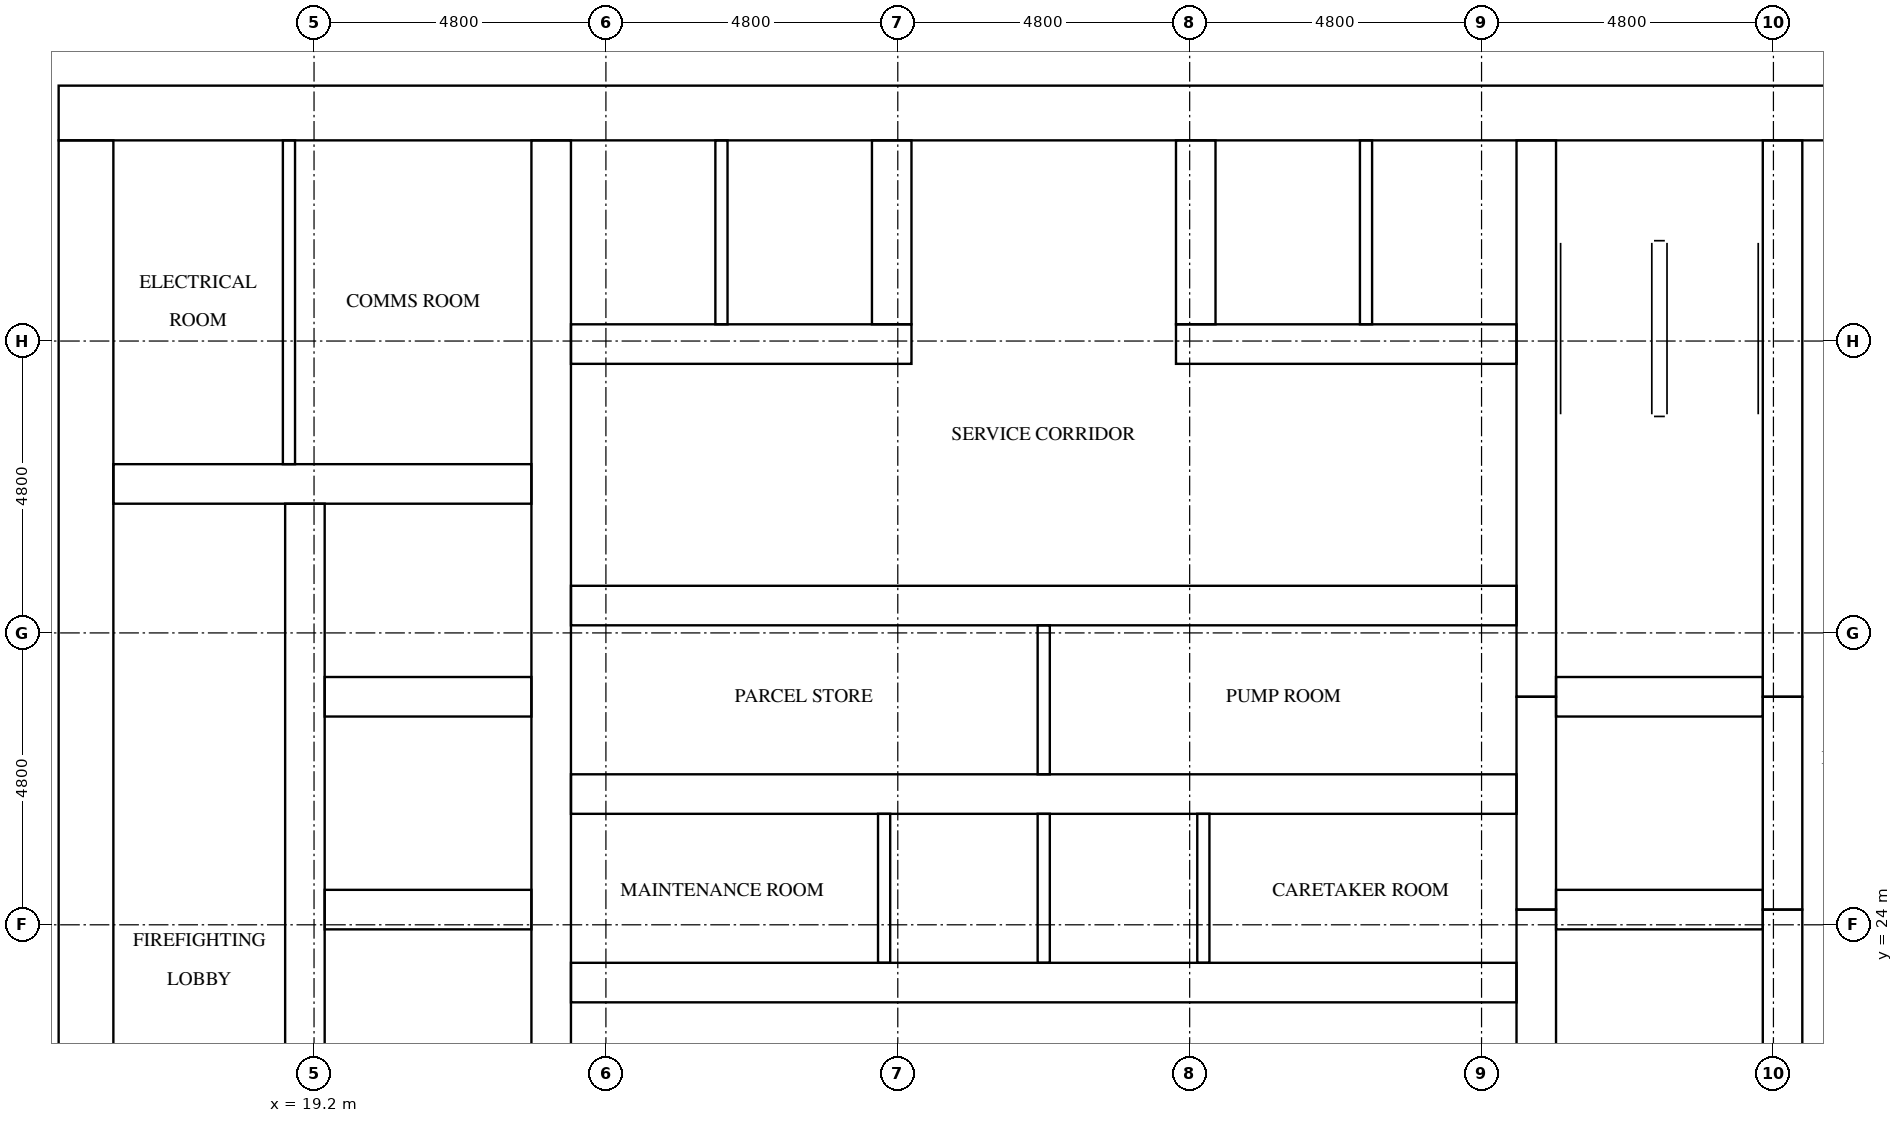
"""IFC4 building model, lengths in metres.
Left out: names, types, materials, properties, quantities, classifications, styles, units other than length and angle.
Written with IfcOpenShell. Run it as: python <this file> out.ifc"""

import sys

from ifc_helpers import new_model, si_unit, direction, frame, frame_2d, origin, place, context, subcontext, project, spatial, rectangle, extrude, element, fill, save


model = new_model("IFC4")
c1 = context("Model", 3, precision=1e-05, world=origin(), true_north=direction((0.0, 1.0)))
c2 = subcontext(c1, "Body", "Model", "MODEL_VIEW")
j1 = project(units=[si_unit("LENGTHUNIT", "METRE"), si_unit("PLANEANGLEUNIT", "RADIAN")], contexts=[c1])
p1 = place(None, origin())
s1 = spatial("IfcSite", under=j1, at=p1, CompositionType="ELEMENT")
p2 = place(p1, origin())
s2 = spatial("IfcBuilding", under=s1, at=p2, CompositionType="ELEMENT")
p3 = place(p2, frame((0.0, 0.0, 96.2)))
s3 = spatial("IfcBuildingStorey", under=s2, at=p3, CompositionType="ELEMENT", Elevation=96.2)
p4 = place(p3, frame((15.0, 37.35, 0.0), z_axis=(0.0, 0.0, 1.0), x_axis=(1.0, 0.0, 0.0)))
e1 = element("IfcWall", 1, at=p4, inside=s3, PredefinedType="SHEAR", context=c2, shape_type="SweptSolid", body=[
    extrude(rectangle(XDim=32.4, YDim=0.9, at=frame_2d((16.2, 0.0))), origin(), (0.0, 0.0, 1.0), 3.2),
])
p5 = place(p4, frame((15.3, 0.0, 0.0)))
e2 = element("IfcOpeningElement", 2, at=p5, cuts=e1, PredefinedType="OPENING", context=c2, shape_type="SweptSolid", body=[
    extrude(rectangle(XDim=1.8, YDim=2.1, at=frame_2d((0.9, 1.05))), frame((0.0, 0.46, 0.0), z_axis=(0.0, -1.0, 0.0), x_axis=(1.0, 0.0, 0.0)), (0.0, 0.0, 1.0), 0.92),
])
p6 = place(p4, frame((1.794, 0.0, 0.0)))
e3 = element("IfcOpeningElement", 3, at=p6, cuts=e1, PredefinedType="OPENING", context=c2, shape_type="SweptSolid", body=[
    extrude(rectangle(XDim=1.0, YDim=2.1, at=frame_2d((0.5, 1.05))), frame((0.0, 0.46, 0.0), z_axis=(0.0, -1.0, 0.0), x_axis=(1.0, 0.0, 0.0)), (0.0, 0.0, 1.0), 0.92),
])
p7 = place(p4, frame((5.331, 0.0, 0.0)))
e4 = element("IfcOpeningElement", 4, at=p7, cuts=e1, PredefinedType="OPENING", context=c2, shape_type="SweptSolid", body=[
    extrude(rectangle(XDim=1.0, YDim=2.1, at=frame_2d((0.5, 1.05))), frame((0.0, 0.46, 0.0), z_axis=(0.0, -1.0, 0.0), x_axis=(1.0, 0.0, 0.0)), (0.0, 0.0, 1.0), 0.92),
])
p8 = place(p3, frame((15.45, 15.9, 0.0), z_axis=(0.0, 0.0, 1.0), x_axis=(0.0, 1.0, 0.0)))
e5 = element("IfcWall", 5, at=p8, inside=s3, PredefinedType="SHEAR", context=c2, shape_type="SweptSolid", body=[
    extrude(rectangle(XDim=21.0, YDim=0.9, at=frame_2d((10.5, 0.0))), origin(), (0.0, 0.0, 1.0), 3.2),
])
p9 = place(p8, frame((4.86, 0.0, 0.0)))
e6 = element("IfcOpeningElement", 6, at=p9, cuts=e5, PredefinedType="OPENING", context=c2, shape_type="SweptSolid", body=[
    extrude(rectangle(XDim=1.2, YDim=2.1, at=frame_2d((0.6, 1.05))), frame((0.0, 0.46, 0.0), z_axis=(0.0, -1.0, 0.0), x_axis=(1.0, 0.0, 0.0)), (0.0, 0.0, 1.0), 0.92),
])
p10 = place(p3, frame((19.05, 15.9, 0.0), z_axis=(0.0, 0.0, 1.0), x_axis=(0.0, 1.0, 0.0)))
e7 = element("IfcWall", 7, at=p10, inside=s3, PredefinedType="SHEAR", context=c2, shape_type="SweptSolid", body=[
    extrude(rectangle(XDim=15.025, YDim=0.65, at=frame_2d((7.513, 0.0))), origin(), (0.0, 0.0, 1.0), 3.2),
])
p11 = place(p10, frame((9.55, 0.0, 0.0)))
e8 = element("IfcOpeningElement", 8, at=p11, cuts=e7, PredefinedType="OPENING", context=c2, shape_type="SweptSolid", body=[
    extrude(rectangle(XDim=1.1, YDim=2.1, at=frame_2d((0.55, 1.05))), frame((0.0, 0.335, 0.0), z_axis=(0.0, -1.0, 0.0), x_axis=(1.0, 0.0, 0.0)), (0.0, 0.0, 1.0), 0.67),
])
p12 = place(p10, frame((13.05, 0.0, 0.0)))
e9 = element("IfcOpeningElement", 9, at=p12, cuts=e7, PredefinedType="OPENING", context=c2, shape_type="SweptSolid", body=[
    extrude(rectangle(XDim=1.1, YDim=2.1, at=frame_2d((0.55, 1.05))), frame((0.0, 0.335, 0.0), z_axis=(0.0, -1.0, 0.0), x_axis=(1.0, 0.0, 0.0)), (0.0, 0.0, 1.0), 0.67),
])
p13 = place(p10, frame((0.3, 0.0, 0.0)))
e10 = element("IfcOpeningElement", 10, at=p13, cuts=e7, PredefinedType="OPENING", context=c2, shape_type="SweptSolid", body=[
    extrude(rectangle(XDim=1.2, YDim=2.1, at=frame_2d((0.6, 1.05))), frame((0.0, 0.335, 0.0), z_axis=(0.0, -1.0, 0.0), x_axis=(1.0, 0.0, 0.0)), (0.0, 0.0, 1.0), 0.67),
])
p14 = place(p3, frame((23.1, 15.9, 0.0), z_axis=(0.0, 0.0, 1.0), x_axis=(0.0, 1.0, 0.0)))
e11 = element("IfcWall", 11, at=p14, inside=s3, PredefinedType="SHEAR", context=c2, shape_type="SweptSolid", body=[
    extrude(rectangle(XDim=21.0, YDim=0.65, at=frame_2d((10.5, 0.0))), origin(), (0.0, 0.0, 1.0), 3.2),
])
p15 = place(p3, frame((39.3, 15.9, 0.0), z_axis=(0.0, 0.0, 1.0), x_axis=(0.0, 1.0, 0.0)))
e12 = element("IfcWall", 12, at=p15, inside=s3, PredefinedType="SHEAR", context=c2, shape_type="SweptSolid", body=[
    extrude(rectangle(XDim=8.35, YDim=0.65, at=frame_2d((4.175, 0.0))), origin(), (0.0, 0.0, 1.0), 3.2),
])
p16 = place(p3, frame((39.3, 24.25, 0.0), z_axis=(0.0, 0.0, 1.0), x_axis=(0.0, 1.0, 0.0)))
e13 = element("IfcWall", 13, at=p16, inside=s3, PredefinedType="SHEAR", context=c2, shape_type="SweptSolid", body=[
    extrude(rectangle(XDim=3.5, YDim=0.65, at=frame_2d((1.75, 0.0))), origin(), (0.0, 0.0, 1.0), 3.2),
])
p17 = place(p3, frame((39.3, 27.75, 0.0), z_axis=(0.0, 0.0, 1.0), x_axis=(0.0, 1.0, 0.0)))
e14 = element("IfcWall", 14, at=p17, inside=s3, PredefinedType="SHEAR", context=c2, shape_type="SweptSolid", body=[
    extrude(rectangle(XDim=9.15, YDim=0.65, at=frame_2d((4.575, 0.0))), origin(), (0.0, 0.0, 1.0), 3.2),
])
p18 = place(p3, frame((43.35, 15.9, 0.0), z_axis=(0.0, 0.0, 1.0), x_axis=(0.0, 1.0, 0.0)))
e15 = element("IfcWall", 15, at=p18, inside=s3, PredefinedType="SHEAR", context=c2, shape_type="SweptSolid", body=[
    extrude(rectangle(XDim=8.35, YDim=0.65, at=frame_2d((4.175, 0.0))), origin(), (0.0, 0.0, 1.0), 3.2),
])
p19 = place(p18, frame((0.3, 0.0, 0.0)))
e16 = element("IfcOpeningElement", 16, at=p19, cuts=e15, PredefinedType="OPENING", context=c2, shape_type="SweptSolid", body=[
    extrude(rectangle(XDim=1.2, YDim=2.1, at=frame_2d((0.6, 1.05))), frame((0.0, 0.335, 0.0), z_axis=(0.0, -1.0, 0.0), x_axis=(1.0, 0.0, 0.0)), (0.0, 0.0, 1.0), 0.67),
])
p20 = place(p3, frame((43.35, 24.25, 0.0), z_axis=(0.0, 0.0, 1.0), x_axis=(0.0, 1.0, 0.0)))
e17 = element("IfcWall", 17, at=p20, inside=s3, PredefinedType="SHEAR", context=c2, shape_type="SweptSolid", body=[
    extrude(rectangle(XDim=3.5, YDim=0.65, at=frame_2d((1.75, 0.0))), origin(), (0.0, 0.0, 1.0), 3.2),
])
p21 = place(p20, frame((1.2, 0.0, 0.0)))
e18 = element("IfcOpeningElement", 18, at=p21, cuts=e17, PredefinedType="OPENING", context=c2, shape_type="SweptSolid", body=[
    extrude(rectangle(XDim=1.1, YDim=2.1, at=frame_2d((0.55, 1.05))), frame((0.0, 0.335, 0.0), z_axis=(0.0, -1.0, 0.0), x_axis=(1.0, 0.0, 0.0)), (0.0, 0.0, 1.0), 0.67),
])
p22 = place(p3, frame((43.35, 27.75, 0.0), z_axis=(0.0, 0.0, 1.0), x_axis=(0.0, 1.0, 0.0)))
e19 = element("IfcWall", 19, at=p22, inside=s3, PredefinedType="SHEAR", context=c2, shape_type="SweptSolid", body=[
    extrude(rectangle(XDim=9.15, YDim=0.65, at=frame_2d((4.575, 0.0))), origin(), (0.0, 0.0, 1.0), 3.2),
])
p23 = place(p22, frame((7.65, 0.0, 0.0)))
e20 = element("IfcOpeningElement", 20, at=p23, cuts=e19, PredefinedType="OPENING", context=c2, shape_type="SweptSolid", body=[
    extrude(rectangle(XDim=1.2, YDim=2.1, at=frame_2d((0.6, 1.05))), frame((0.0, 0.335, 0.0), z_axis=(0.0, -1.0, 0.0), x_axis=(1.0, 0.0, 0.0)), (0.0, 0.0, 1.0), 0.67),
])
for number, where, z_axis, x_axis in (
    (21, (19.375, 24.25, 0.0), (0.0, 0.0, 1.0), (1.0, 0.0, 0.0)),
    (22, (19.375, 27.75, 0.0), (0.0, 0.0, 1.0), (1.0, 0.0, 0.0)),
):
    element("IfcWall", number, at=place(p3, frame(where, z_axis=z_axis, x_axis=x_axis)), inside=s3, PredefinedType="SHEAR", context=c2, shape_type="SweptSolid", body=[
        extrude(rectangle(XDim=3.4, YDim=0.65, at=frame_2d((1.7, 0.0))), origin(), (0.0, 0.0, 1.0), 3.2),
    ])
p24 = place(p3, frame((15.9, 31.25, 0.0), z_axis=(0.0, 0.0, 1.0), x_axis=(1.0, 0.0, 0.0)))
e23 = element("IfcWall", 23, at=p24, inside=s3, PredefinedType="SHEAR", context=c2, shape_type="SweptSolid", body=[
    extrude(rectangle(XDim=6.875, YDim=0.65, at=frame_2d((3.438, 0.0))), origin(), (0.0, 0.0, 1.0), 3.2),
])
for number, where, z_axis, x_axis in (
    (24, (39.625, 24.25, 0.0), (0.0, 0.0, 1.0), (1.0, 0.0, 0.0)),
    (25, (39.625, 27.75, 0.0), (0.0, 0.0, 1.0), (1.0, 0.0, 0.0)),
):
    element("IfcWall", number, at=place(p3, frame(where, z_axis=z_axis, x_axis=x_axis)), inside=s3, PredefinedType="SHEAR", context=c2, shape_type="SweptSolid", body=[
        extrude(rectangle(XDim=3.4, YDim=0.65, at=frame_2d((1.7, 0.0))), origin(), (0.0, 0.0, 1.0), 3.2),
    ])
p25 = place(p3, frame((23.425, 23.05, 0.0), z_axis=(0.0, 0.0, 1.0), x_axis=(1.0, 0.0, 0.0)))
e26 = element("IfcWall", 26, at=p25, inside=s3, PredefinedType="SHEAR", context=c2, shape_type="SweptSolid", body=[
    extrude(rectangle(XDim=15.55, YDim=0.65, at=frame_2d((7.775, 0.0))), origin(), (0.0, 0.0, 1.0), 3.2),
])
p26 = place(p25, frame((2.025, 0.0, 0.0)))
e27 = element("IfcOpeningElement", 27, at=p26, cuts=e26, PredefinedType="OPENING", context=c2, shape_type="SweptSolid", body=[
    extrude(rectangle(XDim=1.0, YDim=2.1, at=frame_2d((0.5, 1.05))), frame((0.0, 0.335, 0.0), z_axis=(0.0, -1.0, 0.0), x_axis=(1.0, 0.0, 0.0)), (0.0, 0.0, 1.0), 0.67),
])
p27 = place(p25, frame((12.525, 0.0, 0.0)))
e28 = element("IfcOpeningElement", 28, at=p27, cuts=e26, PredefinedType="OPENING", context=c2, shape_type="SweptSolid", body=[
    extrude(rectangle(XDim=1.0, YDim=2.1, at=frame_2d((0.5, 1.05))), frame((0.0, 0.335, 0.0), z_axis=(0.0, -1.0, 0.0), x_axis=(1.0, 0.0, 0.0)), (0.0, 0.0, 1.0), 0.67),
])
p28 = place(p3, frame((23.425, 26.15, 0.0), z_axis=(0.0, 0.0, 1.0), x_axis=(1.0, 0.0, 0.0)))
e29 = element("IfcWall", 29, at=p28, inside=s3, PredefinedType="SHEAR", context=c2, shape_type="SweptSolid", body=[
    extrude(rectangle(XDim=15.55, YDim=0.65, at=frame_2d((7.775, 0.0))), origin(), (0.0, 0.0, 1.0), 3.2),
])
p29 = place(p3, frame((23.425, 29.25, 0.0), z_axis=(0.0, 0.0, 1.0), x_axis=(1.0, 0.0, 0.0)))
e30 = element("IfcWall", 30, at=p29, inside=s3, PredefinedType="SHEAR", context=c2, shape_type="SweptSolid", body=[
    extrude(rectangle(XDim=15.55, YDim=0.65, at=frame_2d((7.775, 0.0))), origin(), (0.0, 0.0, 1.0), 3.2),
])
p30 = place(p29, frame((3.337, 0.0, 0.0)))
e31 = element("IfcOpeningElement", 31, at=p30, cuts=e30, PredefinedType="OPENING", context=c2, shape_type="SweptSolid", body=[
    extrude(rectangle(XDim=1.0, YDim=2.1, at=frame_2d((0.5, 1.05))), frame((0.0, 0.335, 0.0), z_axis=(0.0, -1.0, 0.0), x_axis=(1.0, 0.0, 0.0)), (0.0, 0.0, 1.0), 0.67),
])
p31 = place(p29, frame((11.212, 0.0, 0.0)))
e32 = element("IfcOpeningElement", 32, at=p31, cuts=e30, PredefinedType="OPENING", context=c2, shape_type="SweptSolid", body=[
    extrude(rectangle(XDim=1.0, YDim=2.1, at=frame_2d((0.5, 1.05))), frame((0.0, 0.335, 0.0), z_axis=(0.0, -1.0, 0.0), x_axis=(1.0, 0.0, 0.0)), (0.0, 0.0, 1.0), 0.67),
])
p32 = place(p3, frame((23.425, 33.55, 0.0), z_axis=(0.0, 0.0, 1.0), x_axis=(1.0, 0.0, 0.0)))
e33 = element("IfcWall", 33, at=p32, inside=s3, PredefinedType="SHEAR", context=c2, shape_type="SweptSolid", body=[
    extrude(rectangle(XDim=5.6, YDim=0.65, at=frame_2d((2.8, 0.0))), origin(), (0.0, 0.0, 1.0), 3.2),
])
p33 = place(p3, frame((33.375, 33.55, 0.0), z_axis=(0.0, 0.0, 1.0), x_axis=(1.0, 0.0, 0.0)))
e34 = element("IfcWall", 34, at=p33, inside=s3, PredefinedType="SHEAR", context=c2, shape_type="SweptSolid", body=[
    extrude(rectangle(XDim=5.6, YDim=0.65, at=frame_2d((2.8, 0.0))), origin(), (0.0, 0.0, 1.0), 3.2),
])
for number, where, z_axis, x_axis in (
    (35, (28.7, 33.875, 0.0), (0.0, 0.0, 1.0), (0.0, 1.0, 0.0)),
    (36, (33.7, 33.875, 0.0), (0.0, 0.0, 1.0), (0.0, 1.0, 0.0)),
):
    element("IfcWall", number, at=place(p3, frame(where, z_axis=z_axis, x_axis=x_axis)), inside=s3, PredefinedType="SHEAR", context=c2, shape_type="SweptSolid", body=[
        extrude(rectangle(XDim=3.025, YDim=0.65, at=frame_2d((1.512, 0.0))), origin(), (0.0, 0.0, 1.0), 3.2),
    ])
for number, where, z_axis, x_axis in (
    (37, (28.575, 23.375, 0.0), (0.0, 0.0, 1.0), (0.0, 1.0, 0.0)),
    (38, (31.2, 23.375, 0.0), (0.0, 0.0, 1.0), (0.0, 1.0, 0.0)),
    (39, (33.825, 23.375, 0.0), (0.0, 0.0, 1.0), (0.0, 1.0, 0.0)),
):
    element("IfcWall", number, at=place(p3, frame(where, z_axis=z_axis, x_axis=x_axis)), inside=s3, PredefinedType="SOLIDWALL", context=c2, shape_type="SweptSolid", body=[
        extrude(rectangle(XDim=2.45, YDim=0.2, at=frame_2d((1.225, 0.0))), origin(), (0.0, 0.0, 1.0), 3.2),
    ])
for number, where, z_axis, x_axis in (
    (40, (25.9, 33.875, 0.0), (0.0, 0.0, 1.0), (0.0, 1.0, 0.0)),
    (41, (36.5, 33.875, 0.0), (0.0, 0.0, 1.0), (0.0, 1.0, 0.0)),
):
    element("IfcWall", number, at=place(p3, frame(where, z_axis=z_axis, x_axis=x_axis)), inside=s3, PredefinedType="SOLIDWALL", context=c2, shape_type="SweptSolid", body=[
        extrude(rectangle(XDim=3.025, YDim=0.2, at=frame_2d((1.512, 0.0))), origin(), (0.0, 0.0, 1.0), 3.2),
    ])
p34 = place(p3, frame((18.788, 31.575, 0.0), z_axis=(0.0, 0.0, 1.0), x_axis=(0.0, 1.0, 0.0)))
e42 = element("IfcWall", 42, at=p34, inside=s3, PredefinedType="PARTITIONING", context=c2, shape_type="SweptSolid", body=[
    extrude(rectangle(XDim=5.325, YDim=0.2, at=frame_2d((2.663, 0.0))), origin(), (0.0, 0.0, 1.0), 3.2),
])
p35 = place(p3, frame((31.2, 26.475, 0.0), z_axis=(0.0, 0.0, 1.0), x_axis=(0.0, 1.0, 0.0)))
e43 = element("IfcWall", 43, at=p35, inside=s3, PredefinedType="PARTITIONING", context=c2, shape_type="SweptSolid", body=[
    extrude(rectangle(XDim=2.45, YDim=0.2, at=frame_2d((1.225, 0.0))), origin(), (0.0, 0.0, 1.0), 3.2),
])
p36 = place(p11, origin())
e44 = element("IfcDoor", 44, at=p36, inside=s3, OperationType="DOUBLE_DOOR_SLIDING", PredefinedType="DOOR", context=c2, shape_type="SweptSolid", body=[
    extrude(rectangle(XDim=1.1, YDim=2.1, at=frame_2d((0.55, 1.05))), frame((0.0, 0.025, 0.0), z_axis=(0.0, -1.0, 0.0), x_axis=(1.0, 0.0, 0.0)), (0.0, 0.0, 1.0), 0.05),
])
fill(e8, e44)
p37 = place(p12, origin())
e45 = element("IfcDoor", 45, at=p37, inside=s3, OperationType="DOUBLE_DOOR_SLIDING", PredefinedType="DOOR", context=c2, shape_type="SweptSolid", body=[
    extrude(rectangle(XDim=1.1, YDim=2.1, at=frame_2d((0.55, 1.05))), frame((0.0, 0.025, 0.0), z_axis=(0.0, -1.0, 0.0), x_axis=(1.0, 0.0, 0.0)), (0.0, 0.0, 1.0), 0.05),
])
fill(e9, e45)
p38 = place(p21, origin())
e46 = element("IfcDoor", 46, at=p38, inside=s3, OperationType="DOUBLE_DOOR_SLIDING", PredefinedType="DOOR", context=c2, shape_type="SweptSolid", body=[
    extrude(rectangle(XDim=1.1, YDim=2.1, at=frame_2d((0.55, 1.05))), frame((0.0, 0.025, 0.0), z_axis=(0.0, -1.0, 0.0), x_axis=(1.0, 0.0, 0.0)), (0.0, 0.0, 1.0), 0.05),
])
fill(e18, e46)
p39 = place(p23, origin())
e47 = element("IfcDoor", 47, at=p39, inside=s3, OperationType="SINGLE_SWING_RIGHT", PredefinedType="DOOR", context=c2, shape_type="SweptSolid", body=[
    extrude(rectangle(XDim=1.2, YDim=2.1, at=frame_2d((0.6, 1.05))), frame((0.0, 0.025, 0.0), z_axis=(0.0, -1.0, 0.0), x_axis=(1.0, 0.0, 0.0)), (0.0, 0.0, 1.0), 0.05),
])
fill(e20, e47)
p40 = place(p5, origin())
e48 = element("IfcDoor", 48, at=p40, inside=s3, OperationType="DOUBLE_DOOR_SINGLE_SWING", PredefinedType="DOOR", context=c2, shape_type="SweptSolid", body=[
    extrude(rectangle(XDim=1.8, YDim=2.1, at=frame_2d((0.9, 1.05))), frame((0.0, 0.025, 0.0), z_axis=(0.0, -1.0, 0.0), x_axis=(1.0, 0.0, 0.0)), (0.0, 0.0, 1.0), 0.05),
])
fill(e2, e48)
p41 = place(p6, origin())
e49 = element("IfcDoor", 49, at=p41, inside=s3, OperationType="SINGLE_SWING_LEFT", PredefinedType="DOOR", context=c2, shape_type="SweptSolid", body=[
    extrude(rectangle(XDim=1.0, YDim=2.1, at=frame_2d((0.5, 1.05))), frame((0.0, 0.025, 0.0), z_axis=(0.0, -1.0, 0.0), x_axis=(1.0, 0.0, 0.0)), (0.0, 0.0, 1.0), 0.05),
])
fill(e3, e49)
p42 = place(p7, origin())
e50 = element("IfcDoor", 50, at=p42, inside=s3, OperationType="SINGLE_SWING_RIGHT", PredefinedType="DOOR", context=c2, shape_type="SweptSolid", body=[
    extrude(rectangle(XDim=1.0, YDim=2.1, at=frame_2d((0.5, 1.05))), frame((0.0, 0.025, 0.0), z_axis=(0.0, -1.0, 0.0), x_axis=(1.0, 0.0, 0.0)), (0.0, 0.0, 1.0), 0.05),
])
fill(e4, e50)
p43 = place(p26, frame((1.0, 0.0, 0.0), z_axis=(0.0, 0.0, 1.0), x_axis=(-1.0, 0.0, 0.0)))
e51 = element("IfcDoor", 51, at=p43, inside=s3, OperationType="SINGLE_SWING_LEFT", PredefinedType="DOOR", context=c2, shape_type="SweptSolid", body=[
    extrude(rectangle(XDim=1.0, YDim=2.1, at=frame_2d((0.5, 1.05))), frame((0.0, 0.025, 0.0), z_axis=(0.0, -1.0, 0.0), x_axis=(1.0, 0.0, 0.0)), (0.0, 0.0, 1.0), 0.05),
])
fill(e27, e51)
p44 = place(p27, frame((1.0, 0.0, 0.0), z_axis=(0.0, 0.0, 1.0), x_axis=(-1.0, 0.0, 0.0)))
e52 = element("IfcDoor", 52, at=p44, inside=s3, OperationType="SINGLE_SWING_RIGHT", PredefinedType="DOOR", context=c2, shape_type="SweptSolid", body=[
    extrude(rectangle(XDim=1.0, YDim=2.1, at=frame_2d((0.5, 1.05))), frame((0.0, 0.025, 0.0), z_axis=(0.0, -1.0, 0.0), x_axis=(1.0, 0.0, 0.0)), (0.0, 0.0, 1.0), 0.05),
])
fill(e28, e52)
p45 = place(p30, origin())
e53 = element("IfcDoor", 53, at=p45, inside=s3, OperationType="SINGLE_SWING_LEFT", PredefinedType="DOOR", context=c2, shape_type="SweptSolid", body=[
    extrude(rectangle(XDim=1.0, YDim=2.1, at=frame_2d((0.5, 1.05))), frame((0.0, 0.025, 0.0), z_axis=(0.0, -1.0, 0.0), x_axis=(1.0, 0.0, 0.0)), (0.0, 0.0, 1.0), 0.05),
])
fill(e31, e53)
p46 = place(p31, origin())
e54 = element("IfcDoor", 54, at=p46, inside=s3, OperationType="SINGLE_SWING_RIGHT", PredefinedType="DOOR", context=c2, shape_type="SweptSolid", body=[
    extrude(rectangle(XDim=1.0, YDim=2.1, at=frame_2d((0.5, 1.05))), frame((0.0, 0.025, 0.0), z_axis=(0.0, -1.0, 0.0), x_axis=(1.0, 0.0, 0.0)), (0.0, 0.0, 1.0), 0.05),
])
fill(e32, e54)
save(model, sys.argv[1])
